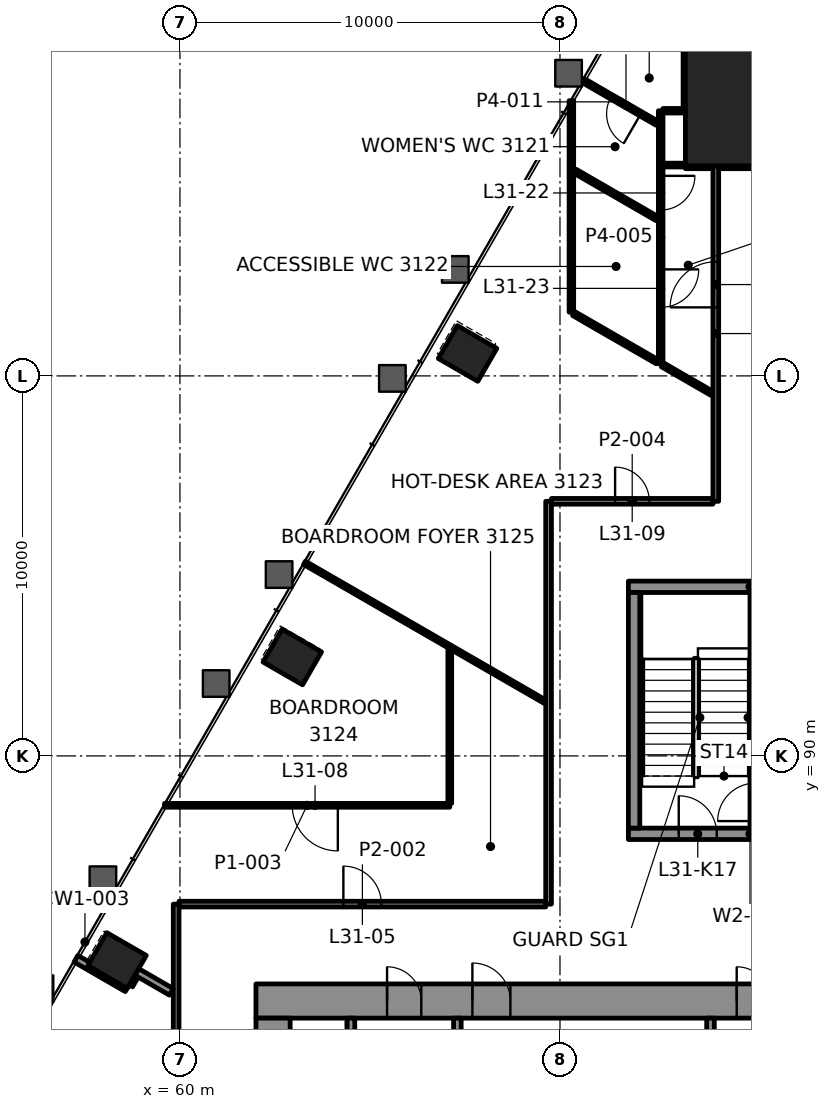
"""IFC4 building model, lengths in metres.
Left out: names, types, materials, properties, quantities, classifications, styles, units other than length and angle.
Written with IfcOpenShell. Run it as: python <this file> out.ifc"""

import sys

from ifc_helpers import new_model, si_unit, direction, frame, frame_2d, origin, origin_2d, place, context, subcontext, project, spatial, rectangle, extrude, element, fill, save


model = new_model("IFC4")
c1 = context("Model", 3, precision=1e-05, world=origin(), true_north=direction((0.0, 1.0)))
c2 = subcontext(c1, "Body", "Model", "MODEL_VIEW")
j1 = project(units=[si_unit("LENGTHUNIT", "METRE"), si_unit("PLANEANGLEUNIT", "RADIAN")], contexts=[c1])
p1 = place(None, origin())
s1 = spatial("IfcSite", under=j1, at=p1, CompositionType="ELEMENT")
p2 = place(p1, origin())
s2 = spatial("IfcBuilding", under=s1, at=p2, CompositionType="ELEMENT")
p3 = place(p2, frame((0.0, 0.0, 136.6)))
s3 = spatial("IfcBuildingStorey", under=s2, at=p3, CompositionType="ELEMENT", Elevation=136.6)
p4 = place(p3, frame((75.0, 107.228, 0.0), z_axis=(0.0, 0.0, 1.0), x_axis=(-1.0, 0.0, 0.0)))
e1 = element("IfcColumn", 1, at=p4, inside=s3, PredefinedType="COLUMN", context=c2, shape_type="SweptSolid", body=[
    extrude(rectangle(XDim=3.4, YDim=3.4, at=origin_2d()), origin(), (0.0, 0.0, 1.0), 4.2),
])
for number, where, z_axis, x_axis in (
    (2, (67.568, 100.591, -0.0), (0.0, 0.0, 1.0), (-0.5, -0.866, 0.0)),
    (3, (62.956, 92.603, -0.0), (0.0, 0.0, 1.0), (-0.5, -0.866, 0.0)),
    (4, (58.345, 84.616, -0.0), (0.0, 0.0, 1.0), (-0.5, -0.866, 0.0)),
):
    element("IfcColumn", number, at=place(p3, frame(where, z_axis=z_axis, x_axis=x_axis)), inside=s3, PredefinedType="COLUMN", context=c2, shape_type="SweptSolid", body=[
        extrude(rectangle(XDim=1.0, YDim=1.2, at=origin_2d()), origin(), (0.0, 0.0, 1.0), 4.2),
    ])
p5 = place(p3, frame((62.0, 83.55, 0.0), z_axis=(0.0, 0.0, 1.0), x_axis=(1.0, 0.0, 0.0)))
e5 = element("IfcWall", 5, at=p5, inside=s3, PredefinedType="SHEAR", context=c2, shape_type="SweptSolid", body=[
    extrude(rectangle(XDim=25.1, YDim=0.9, at=frame_2d((12.55, 0.0))), origin(), (0.0, 0.0, 1.0), 3.9),
])
p6 = place(p5, frame((5.695, 0.0, 0.0)))
e6 = element("IfcOpeningElement", 6, at=p6, cuts=e5, PredefinedType="OPENING", context=c2, shape_type="SweptSolid", body=[
    extrude(rectangle(XDim=1.0, YDim=2.1, at=frame_2d((0.5, 1.05))), frame((0.0, 0.46, 0.0), z_axis=(0.0, -1.0, 0.0), x_axis=(1.0, 0.0, 0.0)), (0.0, 0.0, 1.0), 0.92),
])
p7 = place(p5, frame((19.505, 0.0, 0.0)))
e7 = element("IfcOpeningElement", 7, at=p7, cuts=e5, PredefinedType="OPENING", context=c2, shape_type="SweptSolid", body=[
    extrude(rectangle(XDim=1.0, YDim=2.1, at=frame_2d((0.5, 1.05))), frame((0.0, 0.46, 0.0), z_axis=(0.0, -1.0, 0.0), x_axis=(1.0, 0.0, 0.0)), (0.0, 0.0, 1.0), 0.92),
])
p8 = place(p5, frame((3.45, 0.0, 0.0)))
e8 = element("IfcOpeningElement", 8, at=p8, cuts=e5, PredefinedType="OPENING", context=c2, shape_type="SweptSolid", body=[
    extrude(rectangle(XDim=0.9, YDim=2.1, at=frame_2d((0.45, 1.05))), frame((0.0, 0.46, 0.0), z_axis=(0.0, -1.0, 0.0), x_axis=(1.0, 0.0, 0.0)), (0.0, 0.0, 1.0), 0.92),
])
p9 = place(p5, frame((12.65, 0.0, 0.0)))
e9 = element("IfcOpeningElement", 9, at=p9, cuts=e5, PredefinedType="OPENING", context=c2, shape_type="SweptSolid", body=[
    extrude(rectangle(XDim=0.9, YDim=2.1, at=frame_2d((0.45, 1.05))), frame((0.0, 0.46, 0.0), z_axis=(0.0, -1.0, 0.0), x_axis=(1.0, 0.0, 0.0)), (0.0, 0.0, 1.0), 0.92),
])
p10 = place(p5, frame((22.55, 0.0, 0.0)))
e10 = element("IfcOpeningElement", 10, at=p10, cuts=e5, PredefinedType="OPENING", context=c2, shape_type="SweptSolid", body=[
    extrude(rectangle(XDim=0.9, YDim=2.1, at=frame_2d((0.45, 1.05))), frame((0.0, 0.46, 0.0), z_axis=(0.0, -1.0, 0.0), x_axis=(1.0, 0.0, 0.0)), (0.0, 0.0, 1.0), 0.92),
])
p11 = place(p3, frame((62.45, 66.9, 0.0), z_axis=(0.0, 0.0, 1.0), x_axis=(0.0, 1.0, 0.0)))
e11 = element("IfcWall", 11, at=p11, inside=s3, PredefinedType="SHEAR", context=c2, shape_type="SweptSolid", body=[
    extrude(rectangle(XDim=16.2, YDim=0.9, at=frame_2d((8.1, 0.0))), origin(), (0.0, 0.0, 1.0), 3.9),
])
p12 = place(p11, frame((5.5, 0.0, 0.0)))
e12 = element("IfcOpeningElement", 12, at=p12, cuts=e11, PredefinedType="OPENING", context=c2, shape_type="SweptSolid", body=[
    extrude(rectangle(XDim=1.8, YDim=2.1, at=frame_2d((0.9, 1.05))), frame((0.0, 0.46, 0.0), z_axis=(0.0, -1.0, 0.0), x_axis=(1.0, 0.0, 0.0)), (0.0, 0.0, 1.0), 0.92),
])
p13 = place(p3, frame((71.8, 87.95, 0.0), z_axis=(0.0, 0.0, 1.0), x_axis=(1.0, 0.0, 0.0)))
e13 = element("IfcWall", 13, at=p13, inside=s3, PredefinedType="SHEAR", context=c2, shape_type="SweptSolid", body=[
    extrude(rectangle(XDim=6.4, YDim=0.3, at=frame_2d((3.2, 0.0))), origin(), (0.0, 0.0, 1.0), 3.9),
])
p14 = place(p13, frame((1.325, 0.0, 0.0)))
e14 = element("IfcOpeningElement", 14, at=p14, cuts=e13, PredefinedType="OPENING", context=c2, shape_type="SweptSolid", body=[
    extrude(rectangle(XDim=1.0, YDim=2.1, at=frame_2d((0.5, 1.05))), frame((0.0, 0.16, 0.0), z_axis=(0.0, -1.0, 0.0), x_axis=(1.0, 0.0, 0.0)), (0.0, 0.0, 1.0), 0.32),
])
p15 = place(p13, frame((4.125, 0.0, 0.0)))
e15 = element("IfcOpeningElement", 15, at=p15, cuts=e13, PredefinedType="OPENING", context=c2, shape_type="SweptSolid", body=[
    extrude(rectangle(XDim=1.2, YDim=2.1, at=frame_2d((0.6, 1.05))), frame((0.0, 0.16, 0.0), z_axis=(0.0, -1.0, 0.0), x_axis=(1.0, 0.0, 0.0)), (0.0, 0.0, 1.0), 0.32),
])
p16 = place(p3, frame((71.8, 94.45, 0.0), z_axis=(0.0, 0.0, 1.0), x_axis=(1.0, 0.0, 0.0)))
e16 = element("IfcWall", 16, at=p16, inside=s3, PredefinedType="SHEAR", context=c2, shape_type="SweptSolid", body=[
    extrude(rectangle(XDim=6.4, YDim=0.3, at=frame_2d((3.2, 0.0))), origin(), (0.0, 0.0, 1.0), 3.9),
])
p17 = place(p3, frame((71.95, 88.1, 0.0), z_axis=(0.0, 0.0, 1.0), x_axis=(0.0, 1.0, 0.0)))
e17 = element("IfcWall", 17, at=p17, inside=s3, PredefinedType="SHEAR", context=c2, shape_type="SweptSolid", body=[
    extrude(rectangle(XDim=6.2, YDim=0.3, at=frame_2d((3.1, 0.0))), origin(), (0.0, 0.0, 1.0), 3.9),
])
p18 = place(p3, frame((75.15, 88.1, 0.0), z_axis=(0.0, 0.0, 1.0), x_axis=(0.0, 1.0, 0.0)))
e18 = element("IfcWall", 18, at=p18, inside=s3, PredefinedType="SHEAR", context=c2, shape_type="SweptSolid", body=[
    extrude(rectangle(XDim=6.2, YDim=0.3, at=frame_2d((3.1, 0.0))), origin(), (0.0, 0.0, 1.0), 3.9),
])
p19 = place(p18, frame((0.185, 0.0, 0.0)))
e19 = element("IfcOpeningElement", 19, at=p19, cuts=e18, PredefinedType="OPENING", context=c2, shape_type="SweptSolid", body=[
    extrude(rectangle(XDim=1.0, YDim=2.1, at=frame_2d((0.5, 1.05))), frame((0.0, 0.16, 0.0), z_axis=(0.0, -1.0, 0.0), x_axis=(1.0, 0.0, 0.0)), (0.0, 0.0, 1.0), 0.32),
])
p20 = place(p3, frame((59.976, 86.1, 0.0), z_axis=(0.0, 0.0, 1.0), x_axis=(1.0, 0.0, 0.0)))
e20 = element("IfcWall", 20, at=p20, inside=s3, PredefinedType="PARTITIONING", context=c2, shape_type="SweptSolid", body=[
    extrude(rectangle(XDim=9.649, YDim=0.15, at=frame_2d((4.825, 0.0))), origin(), (0.0, 0.0, 1.0), 3.3),
])
p21 = place(p20, frame((4.325, 0.0, 0.0)))
e21 = element("IfcOpeningElement", 21, at=p21, cuts=e20, PredefinedType="OPENING", context=c2, shape_type="SweptSolid", body=[
    extrude(rectangle(XDim=1.0, YDim=2.1, at=frame_2d((0.5, 1.05))), frame((0.0, 0.085, 0.0), z_axis=(0.0, -1.0, 0.0), x_axis=(1.0, 0.0, 0.0)), (0.0, 0.0, 1.0), 0.17),
])
p22 = place(p3, frame((67.1, 88.7, 0.0), z_axis=(0.0, 0.0, 1.0), x_axis=(-1.0, 0.0, 0.0)))
e22 = element("IfcWall", 22, at=p22, inside=s3, PredefinedType="PARTITIONING", context=c2, shape_type="SweptSolid", body=[
    extrude(rectangle(XDim=7.505, YDim=0.1, at=frame_2d((3.753, 0.0))), origin(), (0.0, 0.0, 1.0), 3.065),
])
p23 = place(p22, frame((2.945, 0.0, 0.0)))
e23 = element("IfcOpeningElement", 23, at=p23, cuts=e22, PredefinedType="OPENING", context=c2, shape_type="SweptSolid", body=[
    extrude(rectangle(XDim=1.2, YDim=2.1, at=frame_2d((0.6, 1.05))), frame((0.0, 0.06, 0.0), z_axis=(0.0, -1.0, 0.0), x_axis=(1.0, 0.0, 0.0)), (0.0, 0.0, 1.0), 0.12),
])
p24 = place(p3, frame((69.775, 96.7, 0.0), z_axis=(0.0, 0.0, 1.0), x_axis=(1.0, 0.0, 0.0)))
e24 = element("IfcWall", 24, at=p24, inside=s3, PredefinedType="PARTITIONING", context=c2, shape_type="SweptSolid", body=[
    extrude(rectangle(XDim=4.25, YDim=0.15, at=frame_2d((2.125, 0.0))), origin(), (0.0, 0.0, 1.0), 3.3),
])
p25 = place(p24, frame((1.675, 0.0, 0.0)))
e25 = element("IfcOpeningElement", 25, at=p25, cuts=e24, PredefinedType="OPENING", context=c2, shape_type="SweptSolid", body=[
    extrude(rectangle(XDim=0.9, YDim=2.1, at=frame_2d((0.45, 1.05))), frame((0.0, 0.085, 0.0), z_axis=(0.0, -1.0, 0.0), x_axis=(1.0, 0.0, 0.0)), (0.0, 0.0, 1.0), 0.17),
])
p26 = place(p3, frame((73.301, 105.528, 0.0), z_axis=(0.0, 0.0, 1.0), x_axis=(1.0, 0.0, 0.0)))
e26 = element("IfcWall", 26, at=p26, inside=s3, PredefinedType="PARTITIONING", context=c2, shape_type="SweptSolid", body=[
    extrude(rectangle(XDim=0.724, YDim=0.15, at=frame_2d((0.362, 0.0))), origin(), (0.0, 0.0, 1.0), 3.3),
])
p27 = place(p3, frame((72.71, 105.548, 0.0), z_axis=(0.0, 0.0, 1.0), x_axis=(1.0, 0.0, 0.0)))
e27 = element("IfcWall", 27, at=p27, inside=s3, PredefinedType="PARTITIONING", context=c2, shape_type="SweptSolid", body=[
    extrude(rectangle(XDim=0.59, YDim=0.1, at=frame_2d((0.295, 0.0))), origin(), (0.0, 0.0, 1.0), 3.3),
])
p28 = place(p3, frame((72.71, 106.978, 0.0), z_axis=(0.0, 0.0, 1.0), x_axis=(1.0, 0.0, 0.0)))
e28 = element("IfcWall", 28, at=p28, inside=s3, PredefinedType="PARTITIONING", context=c2, shape_type="SweptSolid", body=[
    extrude(rectangle(XDim=0.53, YDim=0.12, at=frame_2d((0.265, 0.0))), origin(), (0.0, 0.0, 1.0), 3.3),
])
p29 = place(p3, frame((58.666, 83.972, 0.0), z_axis=(0.0, 0.0, 1.0), x_axis=(0.500030943131, 0.866007538022, 0.0)))
e29 = element("IfcWall", 29, at=p29, inside=s3, PredefinedType="PARTITIONING", context=c2, shape_type="SweptSolid", body=[
    extrude(rectangle(XDim=0.297, YDim=0.2, at=frame_2d((0.148, 0.0))), origin(), (0.0, 0.0, 1.0), 3.3),
])
p30 = place(p3, frame((74.1, 96.7, 0.0), z_axis=(0.0, 0.0, 1.0), x_axis=(0.0, 1.0, 0.0)))
e30 = element("IfcWall", 30, at=p30, inside=s3, PredefinedType="PARTITIONING", context=c2, shape_type="SweptSolid", body=[
    extrude(rectangle(XDim=8.828, YDim=0.15, at=frame_2d((4.414, 0.0))), origin(), (0.0, 0.0, 1.0), 3.3),
])
p31 = place(p30, frame((5.104, 0.0, 0.0)))
e31 = element("IfcOpeningElement", 31, at=p31, cuts=e30, PredefinedType="OPENING", context=c2, shape_type="SweptSolid", body=[
    extrude(rectangle(XDim=1.2, YDim=2.1, at=frame_2d((0.6, 1.05))), frame((0.0, 0.085, 0.0), z_axis=(0.0, -1.0, 0.0), x_axis=(1.0, 0.0, 0.0)), (0.0, 0.0, 1.0), 0.17),
])
p32 = place(p3, frame((73.3, 106.978, 0.0), z_axis=(0.0, 0.0, 1.0), x_axis=(0.0, 1.0, 0.0)))
e32 = element("IfcWall", 32, at=p32, inside=s3, PredefinedType="PARTITIONING", context=c2, shape_type="SweptSolid", body=[
    extrude(rectangle(XDim=2.11, YDim=0.12, at=frame_2d((1.055, 0.0))), origin(), (0.0, 0.0, 1.0), 3.3),
])
p33 = place(p3, frame((72.65, 106.978, 0.0), z_axis=(0.0, 0.0, 1.0), x_axis=(0.0, -1.0, 0.0)))
e33 = element("IfcWall", 33, at=p33, inside=s3, PredefinedType="PARTITIONING", context=c2, shape_type="SweptSolid", body=[
    extrude(rectangle(XDim=6.659, YDim=0.12, at=frame_2d((3.33, 0.0))), origin(), (0.0, 0.0, 1.0), 3.3),
])
p34 = place(p33, frame((1.714, 0.0, 0.0)))
e34 = element("IfcOpeningElement", 34, at=p34, cuts=e33, PredefinedType="OPENING", context=c2, shape_type="SweptSolid", body=[
    extrude(rectangle(XDim=0.9, YDim=2.1, at=frame_2d((0.45, 1.05))), frame((0.0, 0.07, 0.0), z_axis=(0.0, -1.0, 0.0), x_axis=(1.0, 0.0, 0.0)), (0.0, 0.0, 1.0), 0.14),
])
p35 = place(p33, frame((4.175, 0.0, 0.0)))
e35 = element("IfcOpeningElement", 35, at=p35, cuts=e33, PredefinedType="OPENING", context=c2, shape_type="SweptSolid", body=[
    extrude(rectangle(XDim=1.0, YDim=2.1, at=frame_2d((0.5, 1.05))), frame((0.0, 0.07, 0.0), z_axis=(0.0, -1.0, 0.0), x_axis=(1.0, 0.0, 0.0)), (0.0, 0.0, 1.0), 0.14),
])
p36 = place(p3, frame((70.3, 101.677, 0.0), z_axis=(0.0, 0.0, 1.0), x_axis=(0.0, 1.0, 0.0)))
e36 = element("IfcWall", 36, at=p36, inside=s3, PredefinedType="PARTITIONING", context=c2, shape_type="SweptSolid", body=[
    extrude(rectangle(XDim=5.566, YDim=0.12, at=frame_2d((2.783, 0.0))), origin(), (0.0, 0.0, 1.0), 3.3),
])
p37 = place(p3, frame((69.7, 86.1, 0.0), z_axis=(0.0, 0.0, 1.0), x_axis=(0.0, 1.0, 0.0)))
e37 = element("IfcWall", 37, at=p37, inside=s3, PredefinedType="PARTITIONING", context=c2, shape_type="SweptSolid", body=[
    extrude(rectangle(XDim=10.599, YDim=0.15, at=frame_2d((5.3, 0.0))), origin(), (0.0, 0.0, 1.0), 3.222),
])
p38 = place(p3, frame((67.1, 88.75, 0.0), z_axis=(0.0, 0.0, 1.0), x_axis=(0.0, 1.0, 0.0)))
e38 = element("IfcWall", 38, at=p38, inside=s3, PredefinedType="PARTITIONING", context=c2, shape_type="SweptSolid", body=[
    extrude(rectangle(XDim=4.035, YDim=0.1, at=frame_2d((2.018, 0.0))), origin(), (0.0, 0.0, 1.0), 3.222),
])
p39 = place(p3, frame((59.9, 67.321, 0.0), z_axis=(0.0, 0.0, 1.0), x_axis=(0.0, 1.0, 0.0)))
e39 = element("IfcWall", 39, at=p39, inside=s3, PredefinedType="PARTITIONING", context=c2, shape_type="SweptSolid", body=[
    extrude(rectangle(XDim=18.778, YDim=0.15, at=frame_2d((9.389, 0.0))), origin(), (0.0, 0.0, 1.0), 3.3),
])
p40 = place(p39, frame((10.572, 0.0, 0.0)))
e40 = element("IfcOpeningElement", 40, at=p40, cuts=e39, PredefinedType="OPENING", context=c2, shape_type="SweptSolid", body=[
    extrude(rectangle(XDim=1.0, YDim=2.1, at=frame_2d((0.5, 1.05))), frame((0.0, 0.085, 0.0), z_axis=(0.0, -1.0, 0.0), x_axis=(1.0, 0.0, 0.0)), (0.0, 0.0, 1.0), 0.17),
])
p41 = place(p3, frame((72.555, 106.648, 0.0), z_axis=(0.0, 0.0, 1.0), x_axis=(-0.866024802457, 0.500001041529, 0.0)))
e41 = element("IfcWall", 41, at=p41, inside=s3, PredefinedType="PARTITIONING", context=c2, shape_type="SweptSolid", body=[
    extrude(rectangle(XDim=2.25, YDim=0.12, at=frame_2d((1.125, 0.0))), origin(), (0.0, 0.0, 1.0), 3.3),
])
p42 = place(p41, frame((0.495, 0.0, 0.0)))
e42 = element("IfcOpeningElement", 42, at=p42, cuts=e41, PredefinedType="OPENING", context=c2, shape_type="SweptSolid", body=[
    extrude(rectangle(XDim=0.9, YDim=2.1, at=frame_2d((0.45, 1.05))), frame((0.0, 0.07, 0.0), z_axis=(0.0, -1.0, 0.0), x_axis=(1.0, 0.0, 0.0)), (0.0, 0.0, 1.0), 0.14),
])
p43 = place(p3, frame((72.555, 104.138, 0.0), z_axis=(0.0, 0.0, 1.0), x_axis=(-0.866006330792, 0.500033033937, 0.0)))
e43 = element("IfcWall", 43, at=p43, inside=s3, PredefinedType="PARTITIONING", context=c2, shape_type="SweptSolid", body=[
    extrude(rectangle(XDim=2.495, YDim=0.12, at=frame_2d((1.248, 0.0))), origin(), (0.0, 0.0, 1.0), 3.3),
])
p44 = place(p3, frame((73.99, 99.545, 0.0), z_axis=(0.0, 0.0, 1.0), x_axis=(-0.866055123991, 0.49994851956, 0.0)))
e44 = element("IfcWall", 44, at=p44, inside=s3, PredefinedType="PARTITIONING", context=c2, shape_type="SweptSolid", body=[
    extrude(rectangle(XDim=1.496, YDim=0.12, at=frame_2d((0.748, 0.0))), origin(), (0.0, 0.0, 1.0), 3.3),
])
p45 = place(p3, frame((69.599, 91.431, 0.0), z_axis=(0.0, 0.0, 1.0), x_axis=(-0.866036312054, 0.499981105847, 0.0)))
e45 = element("IfcWall", 45, at=p45, inside=s3, PredefinedType="PARTITIONING", context=c2, shape_type="SweptSolid", body=[
    extrude(rectangle(XDim=7.299, YDim=0.1, at=frame_2d((3.649, 0.0))), origin(), (0.0, 0.0, 1.0), 3.065),
])
p46 = place(p3, frame((59.773, 83.792, 0.0), z_axis=(0.0, 0.0, 1.0), x_axis=(-0.866057688017, 0.499944077899, 0.0)))
e46 = element("IfcWall", 46, at=p46, inside=s3, PredefinedType="PARTITIONING", context=c2, shape_type="SweptSolid", body=[
    extrude(rectangle(XDim=1.049, YDim=0.2, at=frame_2d((0.524, 0.0))), origin(), (0.0, 0.0, 1.0), 3.3),
])
p47 = place(p3, frame((58.612, 83.885, 0.0), z_axis=(0.0, 0.0, 1.0), x_axis=(-0.866005410122, 0.500034628441, 0.0)))
e47 = element("IfcWall", 47, at=p47, inside=s3, PredefinedType="PARTITIONING", context=c2, shape_type="SweptSolid", body=[
    extrude(rectangle(XDim=1.557, YDim=0.2, at=frame_2d((0.779, 0.0))), origin(), (0.0, 0.0, 1.0), 3.065),
])
p48 = place(p3, frame((74.175, 105.528, 0.0), z_axis=(0.0, 0.0, 1.0), x_axis=(1.0, 0.0, 0.0)))
e48 = element("IfcWall", 48, at=p48, inside=s3, PredefinedType="PARTITIONING", context=c2, shape_type="SweptSolid", body=[
    extrude(rectangle(XDim=1.649, YDim=0.15, at=frame_2d((0.825, 0.0))), origin(), (0.0, 0.0, 1.0), 3.297),
])
p49 = place(p3, frame((72.56, 100.371, 0.0), z_axis=(0.0, 0.0, 1.0), x_axis=(-0.866004731956, 0.500035802948, 0.0)))
e49 = element("IfcWall", 49, at=p49, inside=s3, PredefinedType="PARTITIONING", context=c2, shape_type="SweptSolid", body=[
    extrude(rectangle(XDim=2.54, YDim=0.12, at=frame_2d((1.27, 0.0))), origin(), (0.0, 0.0, 1.0), 3.3),
])
p50 = place(p3, frame((64.5, 77.9, 0.0), z_axis=(0.0, 0.0, 1.0), x_axis=(0.0, 1.0, 0.0)))
e50 = element("IfcWall", 50, at=p50, inside=s3, PredefinedType="PARTITIONING", context=c2, shape_type="SweptSolid", body=[
    extrude(rectangle(XDim=5.2, YDim=0.2, at=frame_2d((2.6, 0.0))), origin(), (0.0, 0.0, 1.0), 3.9),
])
for number, where, z_axis, x_axis in (
    (51, (67.3, 81.28, 0.0), (0.0, 0.0, 1.0), (0.0, 1.0, 0.0)),
    (52, (73.96, 81.28, 0.0), (0.0, 0.0, 1.0), (0.0, 1.0, 0.0)),
):
    element("IfcWall", number, at=place(p3, frame(where, z_axis=z_axis, x_axis=x_axis)), inside=s3, PredefinedType="PARTITIONING", context=c2, shape_type="SweptSolid", body=[
        extrude(rectangle(XDim=1.82, YDim=0.2, at=frame_2d((0.91, 0.0))), origin(), (0.0, 0.0, 1.0), 3.9),
    ])
p51 = place(p21, origin())
e53 = element("IfcDoor", 53, at=p51, inside=s3, OperationType="SINGLE_SWING_RIGHT", PredefinedType="DOOR", context=c2, shape_type="SweptSolid", body=[
    extrude(rectangle(XDim=1.0, YDim=2.1, at=frame_2d((0.5, 1.05))), frame((0.0, 0.025, 0.0), z_axis=(0.0, -1.0, 0.0), x_axis=(1.0, 0.0, 0.0)), (0.0, 0.0, 1.0), 0.05),
])
fill(e21, e53)
p52 = place(p23, origin())
e54 = element("IfcDoor", 54, at=p52, inside=s3, OperationType="DOUBLE_DOOR_SINGLE_SWING", PredefinedType="DOOR", context=c2, shape_type="SweptSolid", body=[
    extrude(rectangle(XDim=1.2, YDim=2.1, at=frame_2d((0.6, 1.05))), frame((0.0, 0.025, 0.0), z_axis=(0.0, -1.0, 0.0), x_axis=(1.0, 0.0, 0.0)), (0.0, 0.0, 1.0), 0.05),
])
fill(e23, e54)
p53 = place(p25, origin())
e55 = element("IfcDoor", 55, at=p53, inside=s3, OperationType="SINGLE_SWING_RIGHT", PredefinedType="DOOR", context=c2, shape_type="SweptSolid", body=[
    extrude(rectangle(XDim=0.9, YDim=2.1, at=frame_2d((0.45, 1.05))), frame((0.0, 0.025, 0.0), z_axis=(0.0, -1.0, 0.0), x_axis=(1.0, 0.0, 0.0)), (0.0, 0.0, 1.0), 0.05),
])
fill(e25, e55)
p54 = place(p31, origin())
e56 = element("IfcDoor", 56, at=p54, inside=s3, OperationType="DOUBLE_DOOR_SINGLE_SWING", PredefinedType="DOOR", context=c2, shape_type="SweptSolid", body=[
    extrude(rectangle(XDim=1.2, YDim=2.1, at=frame_2d((0.6, 1.05))), frame((0.0, 0.025, 0.0), z_axis=(0.0, -1.0, 0.0), x_axis=(1.0, 0.0, 0.0)), (0.0, 0.0, 1.0), 0.05),
])
fill(e31, e56)
p55 = place(p34, origin())
e57 = element("IfcDoor", 57, at=p55, inside=s3, OperationType="SINGLE_SWING_LEFT", PredefinedType="DOOR", context=c2, shape_type="SweptSolid", body=[
    extrude(rectangle(XDim=0.9, YDim=2.1, at=frame_2d((0.45, 1.05))), frame((0.0, 0.025, 0.0), z_axis=(0.0, -1.0, 0.0), x_axis=(1.0, 0.0, 0.0)), (0.0, 0.0, 1.0), 0.05),
])
fill(e34, e57)
p56 = place(p35, origin())
e58 = element("IfcDoor", 58, at=p56, inside=s3, OperationType="SINGLE_SWING_RIGHT", PredefinedType="DOOR", context=c2, shape_type="SweptSolid", body=[
    extrude(rectangle(XDim=1.0, YDim=2.1, at=frame_2d((0.5, 1.05))), frame((0.0, 0.025, 0.0), z_axis=(0.0, -1.0, 0.0), x_axis=(1.0, 0.0, 0.0)), (0.0, 0.0, 1.0), 0.05),
])
fill(e35, e58)
p57 = place(p42, origin())
e59 = element("IfcDoor", 59, at=p57, inside=s3, OperationType="SINGLE_SWING_LEFT", PredefinedType="DOOR", context=c2, shape_type="SweptSolid", body=[
    extrude(rectangle(XDim=0.9, YDim=2.1, at=frame_2d((0.45, 1.05))), frame((0.0, 0.025, 0.0), z_axis=(0.0, -1.0, 0.0), x_axis=(1.0, 0.0, 0.0)), (0.0, 0.0, 1.0), 0.05),
])
fill(e42, e59)
p58 = place(p6, origin())
e60 = element("IfcDoor", 60, at=p58, inside=s3, OperationType="SINGLE_SWING_LEFT", PredefinedType="DOOR", context=c2, shape_type="SweptSolid", body=[
    extrude(rectangle(XDim=1.0, YDim=2.1, at=frame_2d((0.5, 1.05))), frame((0.0, 0.17, 0.0), z_axis=(0.0, -1.0, 0.0), x_axis=(1.0, 0.0, 0.0)), (0.0, 0.0, 1.0), 0.34),
])
fill(e6, e60)
p59 = place(p14, origin())
e61 = element("IfcDoor", 61, at=p59, inside=s3, OperationType="SINGLE_SWING_RIGHT", PredefinedType="DOOR", context=c2, shape_type="SweptSolid", body=[
    extrude(rectangle(XDim=1.0, YDim=2.1, at=frame_2d((0.5, 1.05))), frame((0.0, 0.025, 0.0), z_axis=(0.0, -1.0, 0.0), x_axis=(1.0, 0.0, 0.0)), (0.0, 0.0, 1.0), 0.05),
])
fill(e14, e61)
p60 = place(p8, origin())
e62 = element("IfcDoor", 62, at=p60, inside=s3, OperationType="SINGLE_SWING_RIGHT", PredefinedType="DOOR", context=c2, shape_type="SweptSolid", body=[
    extrude(rectangle(XDim=0.9, YDim=2.1, at=frame_2d((0.45, 1.05))), frame((0.0, 0.17, 0.0), z_axis=(0.0, -1.0, 0.0), x_axis=(1.0, 0.0, 0.0)), (0.0, 0.0, 1.0), 0.34),
])
fill(e8, e62)
p61 = place(p9, origin())
e63 = element("IfcDoor", 63, at=p61, inside=s3, OperationType="SINGLE_SWING_LEFT", PredefinedType="DOOR", context=c2, shape_type="SweptSolid", body=[
    extrude(rectangle(XDim=0.9, YDim=2.1, at=frame_2d((0.45, 1.05))), frame((0.0, 0.17, 0.0), z_axis=(0.0, -1.0, 0.0), x_axis=(1.0, 0.0, 0.0)), (0.0, 0.0, 1.0), 0.34),
])
fill(e9, e63)
save(model, sys.argv[1])
